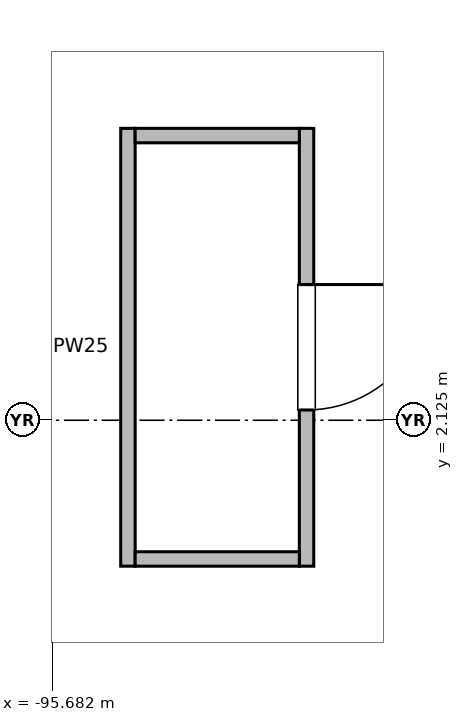
"""IFC4 building model, lengths in metres.
Left out: names, types, materials, properties, quantities, classifications, styles, units other than length and angle.
Written with IfcOpenShell. Run it as: python <this file> out.ifc"""

import sys

from ifc_helpers import new_model, si_unit, direction, frame, frame_2d, origin, place, context, subcontext, project, spatial, rectangle, extrude, element, fill, save


model = new_model("IFC4")
c1 = context("Model", 3, precision=1e-05, world=origin(), true_north=direction((0.0, 1.0)))
c2 = subcontext(c1, "Body", "Model", "MODEL_VIEW")
j1 = project(units=[si_unit("LENGTHUNIT", "METRE"), si_unit("PLANEANGLEUNIT", "RADIAN")], contexts=[c1])
p1 = place(None, origin())
s1 = spatial("IfcSite", under=j1, at=p1, CompositionType="ELEMENT")
p2 = place(p1, origin())
s2 = spatial("IfcBuilding", under=s1, at=p2, CompositionType="ELEMENT")
p3 = place(p2, frame((0.0, 0.0, 16.2)))
s3 = spatial("IfcBuildingStorey", under=s2, at=p3, CompositionType="ELEMENT", Elevation=16.2)
p4 = place(p3, frame((-92.333, 5.965, 0.0), z_axis=(0.0, 0.0, 1.0), x_axis=(0.0, -1.0, 0.0)))
e1 = element("IfcWall", 1, at=p4, inside=s3, PredefinedType="PARTITIONING", context=c2, shape_type="SweptSolid", body=[
    extrude(rectangle(XDim=5.76, YDim=0.19, at=frame_2d((2.88, 0.0))), origin(), (0.0, 0.0, 1.0), 3.475),
])
p5 = place(p4, frame((2.055, 0.0, 0.0)))
e2 = element("IfcOpeningElement", 2, at=p5, cuts=e1, PredefinedType="OPENING", context=c2, shape_type="SweptSolid", body=[
    extrude(rectangle(XDim=1.65, YDim=2.3, at=frame_2d((0.825, 1.15))), frame((0.0, 0.105, 0.0), z_axis=(0.0, -1.0, 0.0), x_axis=(1.0, 0.0, 0.0)), (0.0, 0.0, 1.0), 0.21),
])
p6 = place(p3, frame((-94.683, 0.205, 0.0), z_axis=(0.0, 0.0, 1.0), x_axis=(0.0, 1.0, 0.0)))
e3 = element("IfcWall", 3, at=p6, inside=s3, PredefinedType="PARTITIONING", context=c2, shape_type="SweptSolid", body=[
    extrude(rectangle(XDim=5.76, YDim=0.19, at=frame_2d((2.88, 0.0))), origin(), (0.0, 0.0, 1.0), 3.475),
])
for number, where, z_axis, x_axis in (
    (4, (-94.588, 0.3, 0.0), (0.0, 0.0, 1.0), (1.0, 0.0, 0.0)),
    (5, (-94.588, 5.87, 0.0), (0.0, 0.0, 1.0), (1.0, 0.0, 0.0)),
):
    element("IfcWall", number, at=place(p3, frame(where, z_axis=z_axis, x_axis=x_axis)), inside=s3, PredefinedType="PARTITIONING", context=c2, shape_type="SweptSolid", body=[
        extrude(rectangle(XDim=2.16, YDim=0.19, at=frame_2d((1.08, 0.0))), origin(), (0.0, 0.0, 1.0), 3.82),
    ])
p7 = place(p5, origin())
e6 = element("IfcDoor", 6, at=p7, inside=s3, OperationType="SINGLE_SWING_LEFT", PredefinedType="DOOR", context=c2, shape_type="SweptSolid", body=[
    extrude(rectangle(XDim=1.65, YDim=2.3, at=frame_2d((0.825, 1.15))), frame((0.0, 0.025, 0.0), z_axis=(0.0, -1.0, 0.0), x_axis=(1.0, 0.0, 0.0)), (0.0, 0.0, 1.0), 0.05),
])
fill(e2, e6)
save(model, sys.argv[1])
